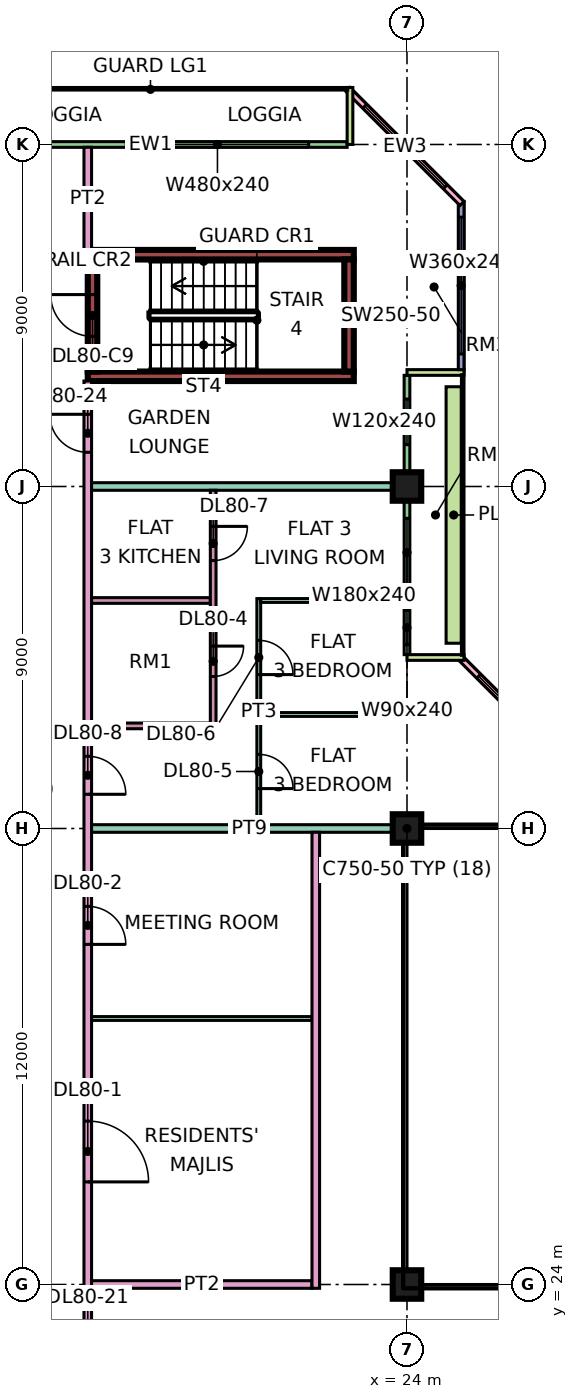
"""IFC4 building model, lengths in metres.
Left out: names, types, materials, properties, quantities, classifications, styles, units other than length and angle.
Written with IfcOpenShell. Run it as: python <this file> out.ifc"""

import sys

from ifc_helpers import new_model, si_unit, direction, frame, frame_2d, origin, origin_2d, place, context, subcontext, project, spatial, rectangle, extrude, element, fill, save


model = new_model("IFC4")
c1 = context("Model", 3, precision=1e-05, world=origin(), true_north=direction((0.0, 1.0)))
c2 = subcontext(c1, "Body", "Model", "MODEL_VIEW")
j1 = project(units=[si_unit("LENGTHUNIT", "METRE"), si_unit("PLANEANGLEUNIT", "RADIAN")], contexts=[c1])
p1 = place(None, origin())
s1 = spatial("IfcSite", under=j1, at=p1, CompositionType="ELEMENT")
p2 = place(p1, origin())
s2 = spatial("IfcBuilding", under=s1, at=p2, CompositionType="ELEMENT")
p3 = place(p2, frame((0.0, 0.0, 346.4)))
s3 = spatial("IfcBuildingStorey", under=s2, at=p3, CompositionType="ELEMENT", Elevation=346.4)
for number, where, z_axis, x_axis in (
    (1, (24.0, 24.0, 0.0), (0.0, 0.0, 1.0), (1.0, 0.0, 0.0)),
    (2, (24.0, 36.0, 0.0), (0.0, 0.0, 1.0), (1.0, 0.0, 0.0)),
    (3, (24.0, 45.0, 0.0), (0.0, 0.0, 1.0), (1.0, 0.0, 0.0)),
):
    element("IfcColumn", number, at=place(p3, frame(where, z_axis=z_axis, x_axis=x_axis)), inside=s3, PredefinedType="COLUMN", context=c2, shape_type="SweptSolid", body=[
        extrude(rectangle(XDim=0.75, YDim=0.75, at=origin_2d()), origin(), (0.0, 0.0, 1.0), 3.75),
    ])
for number, where, z_axis, x_axis in (
    (4, (15.6, 47.9, 0.0), (0.0, 0.0, 1.0), (1.0, 0.0, 0.0)),
    (5, (15.6, 51.1, 0.0), (0.0, 0.0, 1.0), (1.0, 0.0, 0.0)),
):
    element("IfcWall", number, at=place(p3, frame(where, z_axis=z_axis, x_axis=x_axis)), inside=s3, PredefinedType="SHEAR", context=c2, shape_type="SweptSolid", body=[
        extrude(rectangle(XDim=7.0, YDim=0.25, at=frame_2d((3.5, 0.0))), origin(), (0.0, 0.0, 1.0), 3.75),
    ])
p4 = place(p3, frame((15.725, 48.025, 0.0), z_axis=(0.0, 0.0, 1.0), x_axis=(0.0, 1.0, 0.0)))
e6 = element("IfcWall", 6, at=p4, inside=s3, PredefinedType="SHEAR", context=c2, shape_type="SweptSolid", body=[
    extrude(rectangle(XDim=2.95, YDim=0.25, at=frame_2d((1.475, 0.0))), origin(), (0.0, 0.0, 1.0), 3.75),
])
p5 = place(p4, frame((0.925, 0.0, 0.0)))
e7 = element("IfcOpeningElement", 7, at=p5, cuts=e6, PredefinedType="OPENING", context=c2, shape_type="SweptSolid", body=[
    extrude(rectangle(XDim=1.1, YDim=2.2, at=frame_2d((0.55, 1.1))), frame((0.0, 0.135, 0.0), z_axis=(0.0, -1.0, 0.0), x_axis=(1.0, 0.0, 0.0)), (0.0, 0.0, 1.0), 0.27),
])
p6 = place(p3, frame((22.475, 48.025, 0.0), z_axis=(0.0, 0.0, 1.0), x_axis=(0.0, 1.0, 0.0)))
e8 = element("IfcWall", 8, at=p6, inside=s3, PredefinedType="SHEAR", context=c2, shape_type="SweptSolid", body=[
    extrude(rectangle(XDim=2.95, YDim=0.25, at=frame_2d((1.475, 0.0))), origin(), (0.0, 0.0, 1.0), 3.75),
])
p7 = place(p3, frame((28.447, 37.447, 0.0), z_axis=(0.0, 0.0, 1.0), x_axis=(-0.707106781187, 0.707106781187, 0.0)))
e9 = element("IfcWall", 9, at=p7, inside=s3, PredefinedType="SOLIDWALL", context=c2, shape_type="SweptSolid", body=[
    extrude(rectangle(XDim=4.243, YDim=0.15, at=frame_2d((2.121, 0.0))), origin(), (0.0, 0.0, 1.0), 3.35),
])
p8 = place(p7, frame((0.621, 0.0, 0.45)))
e10 = element("IfcOpeningElement", 10, at=p8, cuts=e9, PredefinedType="OPENING", context=c2, shape_type="SweptSolid", body=[
    extrude(rectangle(XDim=3.0, YDim=2.4, at=frame_2d((1.5, 1.2))), frame((0.0, 0.085, 0.0), z_axis=(0.0, -1.0, 0.0), x_axis=(1.0, 0.0, 0.0)), (0.0, 0.0, 1.0), 0.17),
])
p9 = place(p3, frame((24.0, 40.575, 0.0), z_axis=(0.0, 0.0, 1.0), x_axis=(0.0, 1.0, 0.0)))
e11 = element("IfcWall", 11, at=p9, inside=s3, PredefinedType="SOLIDWALL", context=c2, shape_type="SweptSolid", body=[
    extrude(rectangle(XDim=7.35, YDim=0.15, at=frame_2d((3.675, 0.0))), origin(), (0.0, 0.0, 1.0), 3.35),
])
p10 = place(p9, frame((0.262, 0.0, 0.45)))
e12 = element("IfcOpeningElement", 12, at=p10, cuts=e11, PredefinedType="OPENING", context=c2, shape_type="SweptSolid", body=[
    extrude(rectangle(XDim=0.9, YDim=2.4, at=frame_2d((0.45, 1.2))), frame((0.0, 0.085, 0.0), z_axis=(0.0, -1.0, 0.0), x_axis=(1.0, 0.0, 0.0)), (0.0, 0.0, 1.0), 0.17),
])
p11 = place(p9, frame((1.788, 0.0, 0.45)))
e13 = element("IfcOpeningElement", 13, at=p11, cuts=e11, PredefinedType="OPENING", context=c2, shape_type="SweptSolid", body=[
    extrude(rectangle(XDim=1.8, YDim=2.4, at=frame_2d((0.9, 1.2))), frame((0.0, 0.085, 0.0), z_axis=(0.0, -1.0, 0.0), x_axis=(1.0, 0.0, 0.0)), (0.0, 0.0, 1.0), 0.17),
])
p12 = place(p9, frame((5.525, 0.0, 0.45)))
e14 = element("IfcOpeningElement", 14, at=p12, cuts=e11, PredefinedType="OPENING", context=c2, shape_type="SweptSolid", body=[
    extrude(rectangle(XDim=1.2, YDim=2.4, at=frame_2d((0.6, 1.2))), frame((0.0, 0.085, 0.0), z_axis=(0.0, -1.0, 0.0), x_axis=(1.0, 0.0, 0.0)), (0.0, 0.0, 1.0), 0.17),
])
for number, where, z_axis, x_axis in (
    (15, (25.5, 40.5, 0.0), (0.0, 0.0, 1.0), (-1.0, 0.0, 0.0)),
    (16, (25.5, 48.0, 0.0), (0.0, 0.0, 1.0), (-1.0, 0.0, 0.0)),
):
    element("IfcWall", number, at=place(p3, frame(where, z_axis=z_axis, x_axis=x_axis)), inside=s3, PredefinedType="SOLIDWALL", context=c2, shape_type="SweptSolid", body=[
        extrude(rectangle(XDim=1.5, YDim=0.15, at=frame_2d((0.75, 0.0))), origin(), (0.0, 0.0, 1.0), 3.35),
    ])
p13 = place(p3, frame((25.425, 48.075, 0.0), z_axis=(0.0, 0.0, 1.0), x_axis=(0.0, 1.0, 0.0)))
e17 = element("IfcWall", 17, at=p13, inside=s3, PredefinedType="SOLIDWALL", context=c2, shape_type="SweptSolid", body=[
    extrude(rectangle(XDim=4.425, YDim=0.15, at=frame_2d((2.212, 0.0))), origin(), (0.0, 0.0, 1.0), 3.35),
])
p14 = place(p13, frame((0.413, 0.0, 0.45)))
e18 = element("IfcOpeningElement", 18, at=p14, cuts=e17, PredefinedType="OPENING", context=c2, shape_type="SweptSolid", body=[
    extrude(rectangle(XDim=3.6, YDim=2.4, at=frame_2d((1.8, 1.2))), frame((0.0, 0.085, 0.0), z_axis=(0.0, -1.0, 0.0), x_axis=(1.0, 0.0, 0.0)), (0.0, 0.0, 1.0), 0.17),
])
p15 = place(p3, frame((25.447, 52.447, 0.0), z_axis=(0.0, 0.0, 1.0), x_axis=(-0.707106781187, 0.707106781187, 0.0)))
e19 = element("IfcWall", 19, at=p15, inside=s3, PredefinedType="SOLIDWALL", context=c2, shape_type="SweptSolid", body=[
    extrude(rectangle(XDim=4.243, YDim=0.15, at=frame_2d((2.121, 0.0))), origin(), (0.0, 0.0, 1.0), 3.35),
])
p16 = place(p15, frame((0.621, 0.0, 0.45)))
e20 = element("IfcOpeningElement", 20, at=p16, cuts=e19, PredefinedType="OPENING", context=c2, shape_type="SweptSolid", body=[
    extrude(rectangle(XDim=3.0, YDim=2.4, at=frame_2d((1.5, 1.2))), frame((0.0, 0.085, 0.0), z_axis=(0.0, -1.0, 0.0), x_axis=(1.0, 0.0, 0.0)), (0.0, 0.0, 1.0), 0.17),
])
p17 = place(p3, frame((22.425, 54.0, 0.0), z_axis=(0.0, 0.0, 1.0), x_axis=(-1.0, 0.0, 0.0)))
e21 = element("IfcWall", 21, at=p17, inside=s3, PredefinedType="SOLIDWALL", context=c2, shape_type="SweptSolid", body=[
    extrude(rectangle(XDim=10.35, YDim=0.15, at=frame_2d((5.175, 0.0))), origin(), (0.0, 0.0, 1.0), 3.35),
])
p18 = place(p17, frame((1.012, 0.0, 0.45)))
e22 = element("IfcOpeningElement", 22, at=p18, cuts=e21, PredefinedType="OPENING", context=c2, shape_type="SweptSolid", body=[
    extrude(rectangle(XDim=4.8, YDim=2.4, at=frame_2d((2.4, 1.2))), frame((0.0, 0.085, 0.0), z_axis=(0.0, -1.0, 0.0), x_axis=(1.0, 0.0, 0.0)), (0.0, 0.0, 1.0), 0.17),
])
p19 = place(p3, frame((22.5, 55.5, 0.0), z_axis=(0.0, 0.0, 1.0), x_axis=(0.0, -1.0, 0.0)))
e23 = element("IfcWall", 23, at=p19, inside=s3, PredefinedType="SOLIDWALL", context=c2, shape_type="SweptSolid", body=[
    extrude(rectangle(XDim=1.5, YDim=0.15, at=frame_2d((0.75, 0.0))), origin(), (0.0, 0.0, 1.0), 3.35),
])
p20 = place(p3, frame((25.229, 40.875, 0.0), z_axis=(0.0, 0.0, 1.0), x_axis=(0.0, 1.0, 0.0)))
e24 = element("IfcWall", 24, at=p20, inside=s3, PredefinedType="SOLIDWALL", context=c2, shape_type="SweptSolid", body=[
    extrude(rectangle(XDim=6.75, YDim=0.4, at=frame_2d((3.375, 0.0))), origin(), (0.0, 0.0, 1.0), 0.7),
])
p21 = place(p3, frame((15.6, 20.0, 0.0), z_axis=(0.0, 0.0, 1.0), x_axis=(0.0, 1.0, 0.0)))
e25 = element("IfcWall", 25, at=p21, inside=s3, PredefinedType="PARTITIONING", context=c2, shape_type="SweptSolid", body=[
    extrude(rectangle(XDim=27.775, YDim=0.2, at=frame_2d((13.887, 0.0))), origin(), (0.0, 0.0, 1.0), 3.35),
])
p22 = place(p21, frame((6.7, 0.0, 0.0)))
e26 = element("IfcOpeningElement", 26, at=p22, cuts=e25, PredefinedType="OPENING", context=c2, shape_type="SweptSolid", body=[
    extrude(rectangle(XDim=1.6, YDim=2.1, at=frame_2d((0.8, 1.05))), frame((0.0, 0.11, 0.0), z_axis=(0.0, -1.0, 0.0), x_axis=(1.0, 0.0, 0.0)), (0.0, 0.0, 1.0), 0.22),
])
p23 = place(p21, frame((12.95, 0.0, 0.0)))
e27 = element("IfcOpeningElement", 27, at=p23, cuts=e25, PredefinedType="OPENING", context=c2, shape_type="SweptSolid", body=[
    extrude(rectangle(XDim=1.0, YDim=2.1, at=frame_2d((0.5, 1.05))), frame((0.0, 0.11, 0.0), z_axis=(0.0, -1.0, 0.0), x_axis=(1.0, 0.0, 0.0)), (0.0, 0.0, 1.0), 0.22),
])
p24 = place(p21, frame((16.9, 0.0, 0.0)))
e28 = element("IfcOpeningElement", 28, at=p24, cuts=e25, PredefinedType="OPENING", context=c2, shape_type="SweptSolid", body=[
    extrude(rectangle(XDim=1.0, YDim=2.1, at=frame_2d((0.5, 1.05))), frame((0.0, 0.11, 0.0), z_axis=(0.0, -1.0, 0.0), x_axis=(1.0, 0.0, 0.0)), (0.0, 0.0, 1.0), 0.22),
])
p25 = place(p21, frame((1.15, 0.0, 0.0)))
e29 = element("IfcOpeningElement", 29, at=p25, cuts=e25, PredefinedType="OPENING", context=c2, shape_type="SweptSolid", body=[
    extrude(rectangle(XDim=1.8, YDim=2.1, at=frame_2d((0.9, 1.05))), frame((0.0, 0.11, 0.0), z_axis=(0.0, -1.0, 0.0), x_axis=(1.0, 0.0, 0.0)), (0.0, 0.0, 1.0), 0.22),
])
p26 = place(p21, frame((25.9, 0.0, 0.0)))
e30 = element("IfcOpeningElement", 30, at=p26, cuts=e25, PredefinedType="OPENING", context=c2, shape_type="SweptSolid", body=[
    extrude(rectangle(XDim=1.0, YDim=2.1, at=frame_2d((0.5, 1.05))), frame((0.0, 0.11, 0.0), z_axis=(0.0, -1.0, 0.0), x_axis=(1.0, 0.0, 0.0)), (0.0, 0.0, 1.0), 0.22),
])
p27 = place(p3, frame((15.6, 51.225, 0.0), z_axis=(0.0, 0.0, 1.0), x_axis=(0.0, 1.0, 0.0)))
e31 = element("IfcWall", 31, at=p27, inside=s3, PredefinedType="PARTITIONING", context=c2, shape_type="SweptSolid", body=[
    extrude(rectangle(XDim=2.701, YDim=0.2, at=frame_2d((1.351, 0.0))), origin(), (0.0, 0.0, 1.0), 3.35),
])
p28 = place(p3, frame((15.7, 24.0, 0.0), z_axis=(0.0, 0.0, 1.0), x_axis=(1.0, 0.0, 0.0)))
e32 = element("IfcWall", 32, at=p28, inside=s3, PredefinedType="PARTITIONING", context=c2, shape_type="SweptSolid", body=[
    extrude(rectangle(XDim=5.8, YDim=0.2, at=frame_2d((2.9, 0.0))), origin(), (0.0, 0.0, 1.0), 3.35),
])
p29 = place(p3, frame((15.7, 31.0, 0.0), z_axis=(0.0, 0.0, 1.0), x_axis=(1.0, 0.0, 0.0)))
e33 = element("IfcWall", 33, at=p29, inside=s3, PredefinedType="PARTITIONING", context=c2, shape_type="SweptSolid", body=[
    extrude(rectangle(XDim=5.8, YDim=0.1, at=frame_2d((2.9, 0.0))), origin(), (0.0, 0.0, 1.0), 3.35),
])
p30 = place(p3, frame((15.7, 36.0, 0.0), z_axis=(0.0, 0.0, 1.0), x_axis=(1.0, 0.0, 0.0)))
e34 = element("IfcWall", 34, at=p30, inside=s3, PredefinedType="PARTITIONING", context=c2, shape_type="SweptSolid", body=[
    extrude(rectangle(XDim=8.3, YDim=0.2, at=frame_2d((4.15, 0.0))), origin(), (0.0, 0.0, 1.0), 3.35),
])
for number, where, z_axis, x_axis in (
    (35, (15.7, 38.7, 0.0), (0.0, 0.0, 1.0), (1.0, 0.0, 0.0)),
    (36, (15.7, 42.0, 0.0), (0.0, 0.0, 1.0), (1.0, 0.0, 0.0)),
):
    element("IfcWall", number, at=place(p3, frame(where, z_axis=z_axis, x_axis=x_axis)), inside=s3, PredefinedType="PARTITIONING", context=c2, shape_type="SweptSolid", body=[
        extrude(rectangle(XDim=3.125, YDim=0.15, at=frame_2d((1.562, 0.0))), origin(), (0.0, 0.0, 1.0), 3.35),
    ])
p31 = place(p3, frame((15.7, 45.0, 0.0), z_axis=(0.0, 0.0, 1.0), x_axis=(1.0, 0.0, 0.0)))
e37 = element("IfcWall", 37, at=p31, inside=s3, PredefinedType="PARTITIONING", context=c2, shape_type="SweptSolid", body=[
    extrude(rectangle(XDim=8.226, YDim=0.2, at=frame_2d((4.113, 0.0))), origin(), (0.0, 0.0, 1.0), 3.35),
])
p32 = place(p3, frame((18.9, 38.625, 0.0), z_axis=(0.0, 0.0, 1.0), x_axis=(0.0, 1.0, 0.0)))
e38 = element("IfcWall", 38, at=p32, inside=s3, PredefinedType="PARTITIONING", context=c2, shape_type="SweptSolid", body=[
    extrude(rectangle(XDim=6.275, YDim=0.15, at=frame_2d((3.137, 0.0))), origin(), (0.0, 0.0, 1.0), 3.35),
])
p33 = place(p32, frame((1.375, 0.0, 0.0)))
e39 = element("IfcOpeningElement", 39, at=p33, cuts=e38, PredefinedType="OPENING", context=c2, shape_type="SweptSolid", body=[
    extrude(rectangle(XDim=0.8, YDim=2.1, at=frame_2d((0.4, 1.05))), frame((0.0, 0.085, 0.0), z_axis=(0.0, -1.0, 0.0), x_axis=(1.0, 0.0, 0.0)), (0.0, 0.0, 1.0), 0.17),
])
p34 = place(p32, frame((4.425, 0.0, 0.0)))
e40 = element("IfcOpeningElement", 40, at=p34, cuts=e38, PredefinedType="OPENING", context=c2, shape_type="SweptSolid", body=[
    extrude(rectangle(XDim=0.9, YDim=2.1, at=frame_2d((0.45, 1.05))), frame((0.0, 0.085, 0.0), z_axis=(0.0, -1.0, 0.0), x_axis=(1.0, 0.0, 0.0)), (0.0, 0.0, 1.0), 0.17),
])
p35 = place(p3, frame((20.1, 36.1, 0.0), z_axis=(0.0, 0.0, 1.0), x_axis=(0.0, 1.0, 0.0)))
e41 = element("IfcWall", 41, at=p35, inside=s3, PredefinedType="PARTITIONING", context=c2, shape_type="SweptSolid", body=[
    extrude(rectangle(XDim=5.95, YDim=0.1, at=frame_2d((2.975, 0.0))), origin(), (0.0, 0.0, 1.0), 3.35),
])
p36 = place(p35, frame((0.95, 0.0, 0.0)))
e42 = element("IfcOpeningElement", 42, at=p36, cuts=e41, PredefinedType="OPENING", context=c2, shape_type="SweptSolid", body=[
    extrude(rectangle(XDim=0.9, YDim=2.1, at=frame_2d((0.45, 1.05))), frame((0.0, 0.06, 0.0), z_axis=(0.0, -1.0, 0.0), x_axis=(1.0, 0.0, 0.0)), (0.0, 0.0, 1.0), 0.12),
])
p37 = place(p35, frame((3.95, 0.0, 0.0)))
e43 = element("IfcOpeningElement", 43, at=p37, cuts=e41, PredefinedType="OPENING", context=c2, shape_type="SweptSolid", body=[
    extrude(rectangle(XDim=0.9, YDim=2.1, at=frame_2d((0.45, 1.05))), frame((0.0, 0.06, 0.0), z_axis=(0.0, -1.0, 0.0), x_axis=(1.0, 0.0, 0.0)), (0.0, 0.0, 1.0), 0.12),
])
p38 = place(p3, frame((20.15, 39.0, 0.0), z_axis=(0.0, 0.0, 1.0), x_axis=(1.0, 0.0, 0.0)))
e44 = element("IfcWall", 44, at=p38, inside=s3, PredefinedType="PARTITIONING", context=c2, shape_type="SweptSolid", body=[
    extrude(rectangle(XDim=3.85, YDim=0.1, at=frame_2d((1.925, 0.0))), origin(), (0.0, 0.0, 1.0), 3.35),
])
p39 = place(p3, frame((20.15, 42.0, 0.0), z_axis=(0.0, 0.0, 1.0), x_axis=(1.0, 0.0, 0.0)))
e45 = element("IfcWall", 45, at=p39, inside=s3, PredefinedType="PARTITIONING", context=c2, shape_type="SweptSolid", body=[
    extrude(rectangle(XDim=3.776, YDim=0.1, at=frame_2d((1.888, 0.0))), origin(), (0.0, 0.0, 1.0), 3.35),
])
p40 = place(p3, frame((21.6, 23.9, 0.0), z_axis=(0.0, 0.0, 1.0), x_axis=(0.0, 1.0, 0.0)))
e46 = element("IfcWall", 46, at=p40, inside=s3, PredefinedType="PARTITIONING", context=c2, shape_type="SweptSolid", body=[
    extrude(rectangle(XDim=12.0, YDim=0.2, at=frame_2d((6.0, 0.0))), origin(), (0.0, 0.0, 1.0), 3.35),
])
p41 = place(p8, origin())
e47 = element("IfcWindow", 47, at=p41, inside=s3, PartitioningType="SINGLE_PANEL", PredefinedType="WINDOW", context=c2, shape_type="SweptSolid", body=[
    extrude(rectangle(XDim=3.0, YDim=2.4, at=frame_2d((1.5, 1.2))), frame((0.0, 0.03, 0.0), z_axis=(0.0, -1.0, 0.0), x_axis=(1.0, 0.0, 0.0)), (0.0, 0.0, 1.0), 0.06),
])
fill(e10, e47)
p42 = place(p10, origin())
e48 = element("IfcWindow", 48, at=p42, inside=s3, PartitioningType="SINGLE_PANEL", PredefinedType="WINDOW", context=c2, shape_type="SweptSolid", body=[
    extrude(rectangle(XDim=0.9, YDim=2.4, at=frame_2d((0.45, 1.2))), frame((0.0, 0.03, 0.0), z_axis=(0.0, -1.0, 0.0), x_axis=(1.0, 0.0, 0.0)), (0.0, 0.0, 1.0), 0.06),
])
fill(e12, e48)
p43 = place(p11, origin())
e49 = element("IfcWindow", 49, at=p43, inside=s3, PartitioningType="SINGLE_PANEL", PredefinedType="WINDOW", context=c2, shape_type="SweptSolid", body=[
    extrude(rectangle(XDim=1.8, YDim=2.4, at=frame_2d((0.9, 1.2))), frame((0.0, 0.03, 0.0), z_axis=(0.0, -1.0, 0.0), x_axis=(1.0, 0.0, 0.0)), (0.0, 0.0, 1.0), 0.06),
])
fill(e13, e49)
p44 = place(p12, origin())
e50 = element("IfcWindow", 50, at=p44, inside=s3, PartitioningType="SINGLE_PANEL", PredefinedType="WINDOW", context=c2, shape_type="SweptSolid", body=[
    extrude(rectangle(XDim=1.2, YDim=2.4, at=frame_2d((0.6, 1.2))), frame((0.0, 0.03, 0.0), z_axis=(0.0, -1.0, 0.0), x_axis=(1.0, 0.0, 0.0)), (0.0, 0.0, 1.0), 0.06),
])
fill(e14, e50)
p45 = place(p14, origin())
e51 = element("IfcWindow", 51, at=p45, inside=s3, PartitioningType="SINGLE_PANEL", PredefinedType="WINDOW", context=c2, shape_type="SweptSolid", body=[
    extrude(rectangle(XDim=3.6, YDim=2.4, at=frame_2d((1.8, 1.2))), frame((0.0, 0.03, 0.0), z_axis=(0.0, -1.0, 0.0), x_axis=(1.0, 0.0, 0.0)), (0.0, 0.0, 1.0), 0.06),
])
fill(e18, e51)
p46 = place(p16, origin())
e52 = element("IfcWindow", 52, at=p46, inside=s3, PartitioningType="SINGLE_PANEL", PredefinedType="WINDOW", context=c2, shape_type="SweptSolid", body=[
    extrude(rectangle(XDim=3.0, YDim=2.4, at=frame_2d((1.5, 1.2))), frame((0.0, 0.03, 0.0), z_axis=(0.0, -1.0, 0.0), x_axis=(1.0, 0.0, 0.0)), (0.0, 0.0, 1.0), 0.06),
])
fill(e20, e52)
p47 = place(p18, origin())
e53 = element("IfcWindow", 53, at=p47, inside=s3, PartitioningType="SINGLE_PANEL", PredefinedType="WINDOW", context=c2, shape_type="SweptSolid", body=[
    extrude(rectangle(XDim=4.8, YDim=2.4, at=frame_2d((2.4, 1.2))), frame((0.0, 0.03, 0.0), z_axis=(0.0, -1.0, 0.0), x_axis=(1.0, 0.0, 0.0)), (0.0, 0.0, 1.0), 0.06),
])
fill(e22, e53)
p48 = place(p5, frame((1.1, 0.0, 0.0), z_axis=(0.0, 0.0, 1.0), x_axis=(-1.0, 0.0, 0.0)))
e54 = element("IfcDoor", 54, at=p48, inside=s3, OperationType="SINGLE_SWING_RIGHT", PredefinedType="DOOR", context=c2, shape_type="SweptSolid", body=[
    extrude(rectangle(XDim=1.1, YDim=2.2, at=frame_2d((0.55, 1.1))), frame((0.0, 0.025, 0.0), z_axis=(0.0, -1.0, 0.0), x_axis=(1.0, 0.0, 0.0)), (0.0, 0.0, 1.0), 0.05),
])
fill(e7, e54)
p49 = place(p22, frame((1.6, 0.0, 0.0), z_axis=(0.0, 0.0, 1.0), x_axis=(-1.0, 0.0, 0.0)))
e55 = element("IfcDoor", 55, at=p49, inside=s3, OperationType="DOUBLE_DOOR_SINGLE_SWING", PredefinedType="DOOR", context=c2, shape_type="SweptSolid", body=[
    extrude(rectangle(XDim=1.6, YDim=2.1, at=frame_2d((0.8, 1.05))), frame((0.0, 0.025, 0.0), z_axis=(0.0, -1.0, 0.0), x_axis=(1.0, 0.0, 0.0)), (0.0, 0.0, 1.0), 0.05),
])
fill(e26, e55)
p50 = place(p23, frame((1.0, 0.0, 0.0), z_axis=(0.0, 0.0, 1.0), x_axis=(-1.0, 0.0, 0.0)))
e56 = element("IfcDoor", 56, at=p50, inside=s3, OperationType="SINGLE_SWING_LEFT", PredefinedType="DOOR", context=c2, shape_type="SweptSolid", body=[
    extrude(rectangle(XDim=1.0, YDim=2.1, at=frame_2d((0.5, 1.05))), frame((0.0, 0.025, 0.0), z_axis=(0.0, -1.0, 0.0), x_axis=(1.0, 0.0, 0.0)), (0.0, 0.0, 1.0), 0.05),
])
fill(e27, e56)
p51 = place(p33, origin())
e57 = element("IfcDoor", 57, at=p51, inside=s3, OperationType="SINGLE_SWING_RIGHT", PredefinedType="DOOR", context=c2, shape_type="SweptSolid", body=[
    extrude(rectangle(XDim=0.8, YDim=2.1, at=frame_2d((0.4, 1.05))), frame((0.0, 0.025, 0.0), z_axis=(0.0, -1.0, 0.0), x_axis=(1.0, 0.0, 0.0)), (0.0, 0.0, 1.0), 0.05),
])
fill(e39, e57)
p52 = place(p36, frame((0.9, 0.0, 0.0), z_axis=(0.0, 0.0, 1.0), x_axis=(-1.0, 0.0, 0.0)))
e58 = element("IfcDoor", 58, at=p52, inside=s3, OperationType="SINGLE_SWING_LEFT", PredefinedType="DOOR", context=c2, shape_type="SweptSolid", body=[
    extrude(rectangle(XDim=0.9, YDim=2.1, at=frame_2d((0.45, 1.05))), frame((0.0, 0.025, 0.0), z_axis=(0.0, -1.0, 0.0), x_axis=(1.0, 0.0, 0.0)), (0.0, 0.0, 1.0), 0.05),
])
fill(e42, e58)
p53 = place(p37, frame((0.9, 0.0, 0.0), z_axis=(0.0, 0.0, 1.0), x_axis=(-1.0, 0.0, 0.0)))
e59 = element("IfcDoor", 59, at=p53, inside=s3, OperationType="SINGLE_SWING_LEFT", PredefinedType="DOOR", context=c2, shape_type="SweptSolid", body=[
    extrude(rectangle(XDim=0.9, YDim=2.1, at=frame_2d((0.45, 1.05))), frame((0.0, 0.025, 0.0), z_axis=(0.0, -1.0, 0.0), x_axis=(1.0, 0.0, 0.0)), (0.0, 0.0, 1.0), 0.05),
])
fill(e43, e59)
p54 = place(p34, origin())
e60 = element("IfcDoor", 60, at=p54, inside=s3, OperationType="SINGLE_SWING_RIGHT", PredefinedType="DOOR", context=c2, shape_type="SweptSolid", body=[
    extrude(rectangle(XDim=0.9, YDim=2.1, at=frame_2d((0.45, 1.05))), frame((0.0, 0.025, 0.0), z_axis=(0.0, -1.0, 0.0), x_axis=(1.0, 0.0, 0.0)), (0.0, 0.0, 1.0), 0.05),
])
fill(e40, e60)
p55 = place(p24, frame((1.0, 0.0, 0.0), z_axis=(0.0, 0.0, 1.0), x_axis=(-1.0, 0.0, 0.0)))
e61 = element("IfcDoor", 61, at=p55, inside=s3, OperationType="SINGLE_SWING_LEFT", PredefinedType="DOOR", context=c2, shape_type="SweptSolid", body=[
    extrude(rectangle(XDim=1.0, YDim=2.1, at=frame_2d((0.5, 1.05))), frame((0.0, 0.025, 0.0), z_axis=(0.0, -1.0, 0.0), x_axis=(1.0, 0.0, 0.0)), (0.0, 0.0, 1.0), 0.05),
])
fill(e28, e61)
p56 = place(p26, frame((1.0, 0.0, 0.0), z_axis=(0.0, 0.0, 1.0), x_axis=(-1.0, 0.0, 0.0)))
e62 = element("IfcDoor", 62, at=p56, inside=s3, OperationType="SINGLE_SWING_RIGHT", PredefinedType="DOOR", context=c2, shape_type="SweptSolid", body=[
    extrude(rectangle(XDim=1.0, YDim=2.1, at=frame_2d((0.5, 1.05))), frame((0.0, 0.025, 0.0), z_axis=(0.0, -1.0, 0.0), x_axis=(1.0, 0.0, 0.0)), (0.0, 0.0, 1.0), 0.05),
])
fill(e30, e62)
save(model, sys.argv[1])
